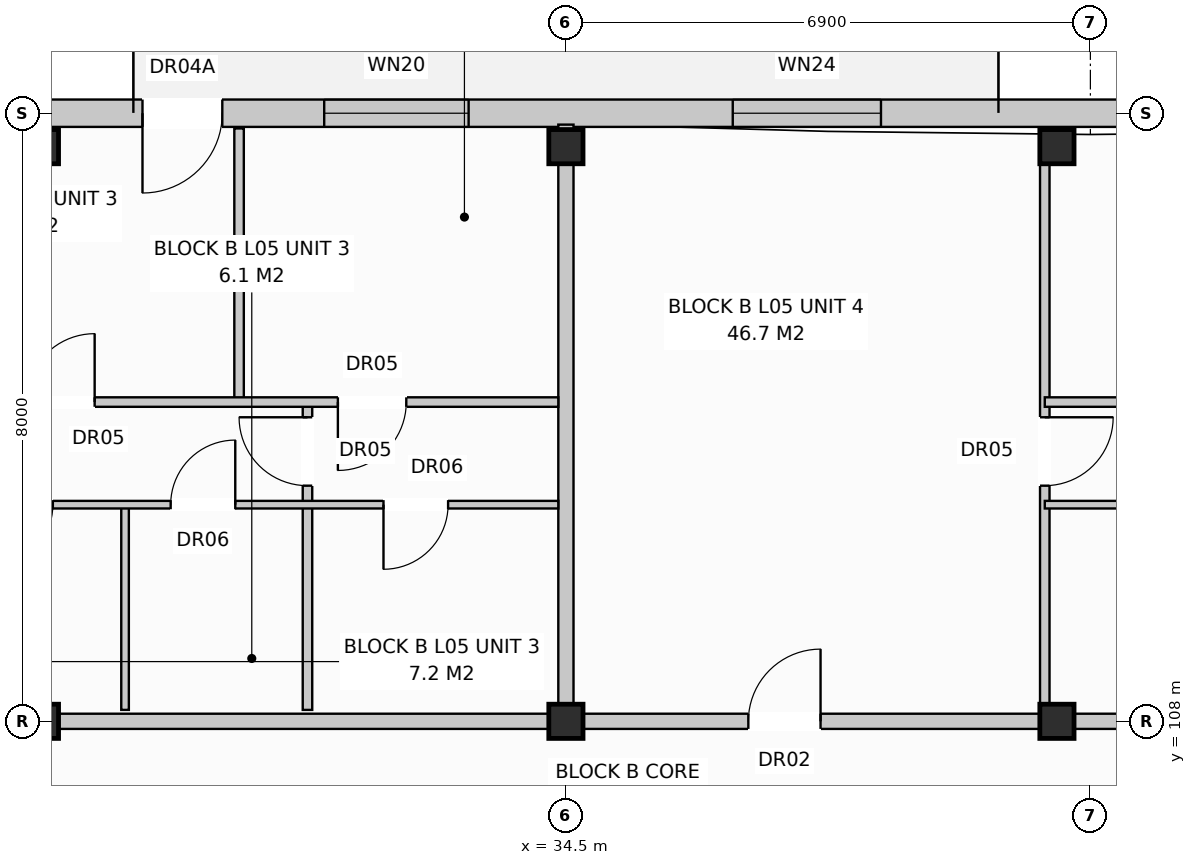
"""IFC4 building model, lengths in metres.
Left out: names, types, materials, properties, quantities, classifications, styles, units other than length and angle.
Written with IfcOpenShell. Run it as: python <this file> out.ifc"""

import sys

from ifc_helpers import new_model, si_unit, direction, frame, frame_2d, origin, origin_with_axes, origin_2d, place, context, subcontext, project, spatial, rectangle, extrude, element, fill, save


model = new_model("IFC4")
c1 = context("Model", 3, precision=1e-05, world=origin(), true_north=direction((0.0, 1.0)))
c2 = subcontext(c1, "Body", "Model", "MODEL_VIEW")
j1 = project(units=[si_unit("LENGTHUNIT", "METRE"), si_unit("PLANEANGLEUNIT", "RADIAN")], contexts=[c1])
p1 = place(None, origin())
s1 = spatial("IfcSite", under=j1, at=p1, CompositionType="ELEMENT")
p2 = place(p1, origin())
s2 = spatial("IfcBuilding", under=s1, at=p2, CompositionType="ELEMENT")
p3 = place(p2, frame((0.0, 0.0, 17.6)))
s3 = spatial("IfcBuildingStorey", under=s2, at=p3, CompositionType="ELEMENT", Elevation=17.6)
for number, where, z_axis, x_axis in (
    (1, (27.6, 108.0, 0.0), (0.0, 0.0, 1.0), (1.0, 0.0, 0.0)),
    (2, (27.6, 115.56, 0.0), (0.0, 0.0, 1.0), (1.0, 0.0, 0.0)),
    (3, (34.5, 108.0, 0.0), (0.0, 0.0, 1.0), (1.0, 0.0, 0.0)),
    (4, (34.5, 115.56, 0.0), (0.0, 0.0, 1.0), (1.0, 0.0, 0.0)),
    (5, (40.96, 108.0, 0.0), (0.0, 0.0, 1.0), (1.0, 0.0, 0.0)),
    (6, (40.96, 115.56, 0.0), (0.0, 0.0, 1.0), (1.0, 0.0, 0.0)),
):
    element("IfcColumn", number, at=place(p3, frame(where, z_axis=z_axis, x_axis=x_axis)), inside=s3, PredefinedType="COLUMN", context=c2, shape_type="SweptSolid", body=[
        extrude(rectangle(XDim=0.45, YDim=0.45, at=origin_2d()), origin(), (0.0, 0.0, 1.0), 3.2),
    ])
p4 = place(p3, frame((0.17, 116.0, 0.0), z_axis=(0.0, 0.0, 1.0), x_axis=(1.0, 0.0, 0.0)))
e7 = element("IfcWall", 7, at=p4, inside=s3, PredefinedType="STANDARD", context=c2, shape_type="SweptSolid", body=[
    extrude(rectangle(XDim=54.86, YDim=0.36, at=frame_2d((27.43, 0.0))), origin(), (0.0, 0.0, 1.0), 2.95),
])
p5 = place(p4, frame((2.459, 0.0, 0.0)))
e8 = element("IfcOpeningElement", 8, at=p5, cuts=e7, PredefinedType="OPENING", context=c2, shape_type="SweptSolid", body=[
    extrude(rectangle(XDim=1.05, YDim=2.12, at=frame_2d((0.525, 1.06))), frame((0.0, 0.192, 0.0), z_axis=(0.0, -1.0, 0.0), x_axis=(1.0, 0.0, 0.0)), (0.0, 0.0, 1.0), 0.384),
])
p6 = place(p4, frame((18.85, 0.0, 0.0)))
e9 = element("IfcOpeningElement", 9, at=p6, cuts=e7, PredefinedType="OPENING", context=c2, shape_type="SweptSolid", body=[
    extrude(rectangle(XDim=1.05, YDim=2.12, at=frame_2d((0.525, 1.06))), frame((0.0, 0.192, 0.0), z_axis=(0.0, -1.0, 0.0), x_axis=(1.0, 0.0, 0.0)), (0.0, 0.0, 1.0), 0.384),
])
p7 = place(p4, frame((28.76, 0.0, 0.0)))
e10 = element("IfcOpeningElement", 10, at=p7, cuts=e7, PredefinedType="OPENING", context=c2, shape_type="SweptSolid", body=[
    extrude(rectangle(XDim=1.05, YDim=2.12, at=frame_2d((0.525, 1.06))), frame((0.0, 0.192, 0.0), z_axis=(0.0, -1.0, 0.0), x_axis=(1.0, 0.0, 0.0)), (0.0, 0.0, 1.0), 0.384),
])
p8 = place(p4, frame((46.45, 0.0, 0.0)))
e11 = element("IfcOpeningElement", 11, at=p8, cuts=e7, PredefinedType="OPENING", context=c2, shape_type="SweptSolid", body=[
    extrude(rectangle(XDim=1.05, YDim=2.12, at=frame_2d((0.525, 1.06))), frame((0.0, 0.192, 0.0), z_axis=(0.0, -1.0, 0.0), x_axis=(1.0, 0.0, 0.0)), (0.0, 0.0, 1.0), 0.384),
])
p9 = place(p4, frame((0.75, 0.0, 0.72)))
e12 = element("IfcOpeningElement", 12, at=p9, cuts=e7, PredefinedType="OPENING", context=c2, shape_type="SweptSolid", body=[
    extrude(rectangle(XDim=1.1, YDim=1.5, at=frame_2d((0.55, 0.75))), frame((0.0, 0.192, 0.0), z_axis=(0.0, -1.0, 0.0), x_axis=(1.0, 0.0, 0.0)), (0.0, 0.0, 1.0), 0.384),
])
p10 = place(p4, frame((4.225, 0.0, 0.8)))
e13 = element("IfcOpeningElement", 13, at=p10, cuts=e7, PredefinedType="OPENING", context=c2, shape_type="SweptSolid", body=[
    extrude(rectangle(XDim=1.95, YDim=1.65, at=frame_2d((0.975, 0.825))), frame((0.0, 0.192, 0.0), z_axis=(0.0, -1.0, 0.0), x_axis=(1.0, 0.0, 0.0)), (0.0, 0.0, 1.0), 0.384),
])
p11 = place(p4, frame((8.0, 0.0, 0.8)))
e14 = element("IfcOpeningElement", 14, at=p11, cuts=e7, PredefinedType="OPENING", context=c2, shape_type="SweptSolid", body=[
    extrude(rectangle(XDim=1.8, YDim=1.7, at=frame_2d((0.9, 0.85))), frame((0.0, 0.192, 0.0), z_axis=(0.0, -1.0, 0.0), x_axis=(1.0, 0.0, 0.0)), (0.0, 0.0, 1.0), 0.384),
])
p12 = place(p4, frame((11.65, 0.0, 0.72)))
e15 = element("IfcOpeningElement", 15, at=p12, cuts=e7, PredefinedType="OPENING", context=c2, shape_type="SweptSolid", body=[
    extrude(rectangle(XDim=1.1, YDim=1.5, at=frame_2d((0.55, 0.75))), frame((0.0, 0.192, 0.0), z_axis=(0.0, -1.0, 0.0), x_axis=(1.0, 0.0, 0.0)), (0.0, 0.0, 1.0), 0.384),
])
p13 = place(p4, frame((16.675, 0.0, 0.8)))
e16 = element("IfcOpeningElement", 16, at=p13, cuts=e7, PredefinedType="OPENING", context=c2, shape_type="SweptSolid", body=[
    extrude(rectangle(XDim=1.95, YDim=1.65, at=frame_2d((0.975, 0.825))), frame((0.0, 0.192, 0.0), z_axis=(0.0, -1.0, 0.0), x_axis=(1.0, 0.0, 0.0)), (0.0, 0.0, 1.0), 0.384),
])
p14 = place(p4, frame((22.3, 0.0, 0.8)))
e17 = element("IfcOpeningElement", 17, at=p14, cuts=e7, PredefinedType="OPENING", context=c2, shape_type="SweptSolid", body=[
    extrude(rectangle(XDim=1.8, YDim=1.7, at=frame_2d((0.9, 0.85))), frame((0.0, 0.192, 0.0), z_axis=(0.0, -1.0, 0.0), x_axis=(1.0, 0.0, 0.0)), (0.0, 0.0, 1.0), 0.384),
])
p15 = place(p4, frame((31.15, 0.0, 0.72)))
e18 = element("IfcOpeningElement", 18, at=p15, cuts=e7, PredefinedType="OPENING", context=c2, shape_type="SweptSolid", body=[
    extrude(rectangle(XDim=1.9, YDim=1.85, at=frame_2d((0.95, 0.925))), frame((0.0, 0.192, 0.0), z_axis=(0.0, -1.0, 0.0), x_axis=(1.0, 0.0, 0.0)), (0.0, 0.0, 1.0), 0.384),
])
p16 = place(p4, frame((36.525, 0.0, 0.8)))
e19 = element("IfcOpeningElement", 19, at=p16, cuts=e7, PredefinedType="OPENING", context=c2, shape_type="SweptSolid", body=[
    extrude(rectangle(XDim=1.95, YDim=1.65, at=frame_2d((0.975, 0.825))), frame((0.0, 0.192, 0.0), z_axis=(0.0, -1.0, 0.0), x_axis=(1.0, 0.0, 0.0)), (0.0, 0.0, 1.0), 0.384),
])
p17 = place(p4, frame((42.3, 0.0, 0.8)))
e20 = element("IfcOpeningElement", 20, at=p17, cuts=e7, PredefinedType="OPENING", context=c2, shape_type="SweptSolid", body=[
    extrude(rectangle(XDim=1.8, YDim=1.7, at=frame_2d((0.9, 0.85))), frame((0.0, 0.192, 0.0), z_axis=(0.0, -1.0, 0.0), x_axis=(1.0, 0.0, 0.0)), (0.0, 0.0, 1.0), 0.384),
])
p18 = place(p4, frame((49.05, 0.0, 0.72)))
e21 = element("IfcOpeningElement", 21, at=p18, cuts=e7, PredefinedType="OPENING", context=c2, shape_type="SweptSolid", body=[
    extrude(rectangle(XDim=1.1, YDim=1.5, at=frame_2d((0.55, 0.75))), frame((0.0, 0.192, 0.0), z_axis=(0.0, -1.0, 0.0), x_axis=(1.0, 0.0, 0.0)), (0.0, 0.0, 1.0), 0.384),
])
p19 = place(p4, frame((52.025, 0.0, 0.8)))
e22 = element("IfcOpeningElement", 22, at=p19, cuts=e7, PredefinedType="OPENING", context=c2, shape_type="SweptSolid", body=[
    extrude(rectangle(XDim=1.95, YDim=1.65, at=frame_2d((0.975, 0.825))), frame((0.0, 0.192, 0.0), z_axis=(0.0, -1.0, 0.0), x_axis=(1.0, 0.0, 0.0)), (0.0, 0.0, 1.0), 0.384),
])
p20 = place(p3, frame((34.5, 108.15, 0.0), z_axis=(0.0, 0.0, 1.0), x_axis=(0.0, 1.0, 0.0)))
e23 = element("IfcWall", 23, at=p20, inside=s3, PredefinedType="PARTITIONING", context=c2, shape_type="SweptSolid", body=[
    extrude(rectangle(XDim=7.7, YDim=0.2, at=frame_2d((3.85, 0.0))), origin(), (0.0, 0.0, 1.0), 2.95),
])
p21 = place(p3, frame((20.7, 108.0, 0.0), z_axis=(0.0, 0.0, 1.0), x_axis=(1.0, 0.0, 0.0)))
e24 = element("IfcWall", 24, at=p21, inside=s3, PredefinedType="PARTITIONING", context=c2, shape_type="SweptSolid", body=[
    extrude(rectangle(XDim=13.8, YDim=0.2, at=frame_2d((6.9, 0.0))), origin(), (0.0, 0.0, 1.0), 2.39),
])
p22 = place(p21, frame((2.4, 0.0, 0.0)))
e25 = element("IfcOpeningElement", 25, at=p22, cuts=e24, PredefinedType="OPENING", context=c2, shape_type="SweptSolid", body=[
    extrude(rectangle(XDim=0.95, YDim=2.15, at=frame_2d((0.475, 1.075))), frame((0.0, 0.112, 0.0), z_axis=(0.0, -1.0, 0.0), x_axis=(1.0, 0.0, 0.0)), (0.0, 0.0, 1.0), 0.224),
])
p23 = place(p3, frame((28.7, 108.15, 0.0), z_axis=(0.0, 0.0, 1.0), x_axis=(0.0, 1.0, 0.0)))
e26 = element("IfcWall", 26, at=p23, inside=s3, PredefinedType="PARTITIONING", context=c2, shape_type="SweptSolid", body=[
    extrude(rectangle(XDim=2.7, YDim=0.1, at=frame_2d((1.35, 0.0))), origin(), (0.0, 0.0, 1.0), 2.59),
])
p24 = place(p3, frame((31.1, 108.15, 0.0), z_axis=(0.0, 0.0, 1.0), x_axis=(0.0, 1.0, 0.0)))
e27 = element("IfcWall", 27, at=p24, inside=s3, PredefinedType="PARTITIONING", context=c2, shape_type="SweptSolid", body=[
    extrude(rectangle(XDim=4.05, YDim=0.125, at=frame_2d((2.025, 0.0))), origin(), (0.0, 0.0, 1.0), 2.95),
])
p25 = place(p24, frame((2.95, 0.0, 0.0)))
e28 = element("IfcOpeningElement", 28, at=p25, cuts=e27, PredefinedType="OPENING", context=c2, shape_type="SweptSolid", body=[
    extrude(rectangle(XDim=0.9, YDim=2.1, at=frame_2d((0.45, 1.05))), frame((0.0, 0.074, 0.0), z_axis=(0.0, -1.0, 0.0), x_axis=(1.0, 0.0, 0.0)), (0.0, 0.0, 1.0), 0.149),
])
p26 = place(p3, frame((30.2, 112.2, 0.0), z_axis=(0.0, 0.0, 1.0), x_axis=(0.0, 1.0, 0.0)))
e29 = element("IfcWall", 29, at=p26, inside=s3, PredefinedType="PARTITIONING", context=c2, shape_type="SweptSolid", body=[
    extrude(rectangle(XDim=3.6, YDim=0.125, at=frame_2d((1.8, 0.0))), origin(), (0.0, 0.0, 1.0), 2.95),
])
p27 = place(p3, frame((25.9, 110.85, 0.0), z_axis=(0.0, 0.0, 1.0), x_axis=(1.0, 0.0, 0.0)))
e30 = element("IfcWall", 30, at=p27, inside=s3, PredefinedType="PARTITIONING", context=c2, shape_type="SweptSolid", body=[
    extrude(rectangle(XDim=8.5, YDim=0.1, at=frame_2d((4.25, 0.0))), origin(), (0.0, 0.0, 1.0), 2.95),
])
p28 = place(p27, frame((1.0, 0.0, 0.0)))
e31 = element("IfcOpeningElement", 31, at=p28, cuts=e30, PredefinedType="OPENING", context=c2, shape_type="SweptSolid", body=[
    extrude(rectangle(XDim=0.85, YDim=2.1, at=frame_2d((0.425, 1.05))), frame((0.0, 0.062, 0.0), z_axis=(0.0, -1.0, 0.0), x_axis=(1.0, 0.0, 0.0)), (0.0, 0.0, 1.0), 0.124),
])
p29 = place(p27, frame((3.4, 0.0, 0.0)))
e32 = element("IfcOpeningElement", 32, at=p29, cuts=e30, PredefinedType="OPENING", context=c2, shape_type="SweptSolid", body=[
    extrude(rectangle(XDim=0.85, YDim=2.05, at=frame_2d((0.425, 1.025))), frame((0.0, 0.062, 0.0), z_axis=(0.0, -1.0, 0.0), x_axis=(1.0, 0.0, 0.0)), (0.0, 0.0, 1.0), 0.124),
])
p30 = place(p27, frame((6.2, 0.0, 0.0)))
e33 = element("IfcOpeningElement", 33, at=p30, cuts=e30, PredefinedType="OPENING", context=c2, shape_type="SweptSolid", body=[
    extrude(rectangle(XDim=0.85, YDim=2.05, at=frame_2d((0.425, 1.025))), frame((0.0, 0.062, 0.0), z_axis=(0.0, -1.0, 0.0), x_axis=(1.0, 0.0, 0.0)), (0.0, 0.0, 1.0), 0.124),
])
p31 = place(p3, frame((25.9, 112.2, 0.0), z_axis=(0.0, 0.0, 1.0), x_axis=(1.0, 0.0, 0.0)))
e34 = element("IfcWall", 34, at=p31, inside=s3, PredefinedType="PARTITIONING", context=c2, shape_type="SweptSolid", body=[
    extrude(rectangle(XDim=8.5, YDim=0.125, at=frame_2d((4.25, 0.0))), origin(), (0.0, 0.0, 1.0), 2.95),
])
p32 = place(p31, frame((1.5, 0.0, 0.0)))
e35 = element("IfcOpeningElement", 35, at=p32, cuts=e34, PredefinedType="OPENING", context=c2, shape_type="SweptSolid", body=[
    extrude(rectangle(XDim=0.9, YDim=2.1, at=frame_2d((0.45, 1.05))), frame((0.0, 0.074, 0.0), z_axis=(0.0, -1.0, 0.0), x_axis=(1.0, 0.0, 0.0)), (0.0, 0.0, 1.0), 0.149),
])
p33 = place(p31, frame((5.6, 0.0, 0.0)))
e36 = element("IfcOpeningElement", 36, at=p33, cuts=e34, PredefinedType="OPENING", context=c2, shape_type="SweptSolid", body=[
    extrude(rectangle(XDim=0.9, YDim=2.1, at=frame_2d((0.45, 1.05))), frame((0.0, 0.074, 0.0), z_axis=(0.0, -1.0, 0.0), x_axis=(1.0, 0.0, 0.0)), (0.0, 0.0, 1.0), 0.149),
])
p34 = place(p3, frame((34.5, 108.0, 0.0), z_axis=(0.0, 0.0, 1.0), x_axis=(1.0, 0.0, 0.0)))
e37 = element("IfcWall", 37, at=p34, inside=s3, PredefinedType="PARTITIONING", context=c2, shape_type="SweptSolid", body=[
    extrude(rectangle(XDim=20.7, YDim=0.2, at=frame_2d((10.35, 0.0))), origin(), (0.0, 0.0, 1.0), 2.39),
])
p35 = place(p34, frame((2.4, 0.0, 0.0)))
e38 = element("IfcOpeningElement", 38, at=p35, cuts=e37, PredefinedType="OPENING", context=c2, shape_type="SweptSolid", body=[
    extrude(rectangle(XDim=0.95, YDim=2.15, at=frame_2d((0.475, 1.075))), frame((0.0, 0.112, 0.0), z_axis=(0.0, -1.0, 0.0), x_axis=(1.0, 0.0, 0.0)), (0.0, 0.0, 1.0), 0.224),
])
p36 = place(p3, frame((40.8, 108.15, 0.0), z_axis=(0.0, 0.0, 1.0), x_axis=(0.0, 1.0, 0.0)))
e39 = element("IfcWall", 39, at=p36, inside=s3, PredefinedType="PARTITIONING", context=c2, shape_type="SweptSolid", body=[
    extrude(rectangle(XDim=7.65, YDim=0.125, at=frame_2d((3.825, 0.0))), origin(), (0.0, 0.0, 1.0), 2.59),
])
p37 = place(p36, frame((2.95, 0.0, 0.0)))
e40 = element("IfcOpeningElement", 40, at=p37, cuts=e39, PredefinedType="OPENING", context=c2, shape_type="SweptSolid", body=[
    extrude(rectangle(XDim=0.9, YDim=2.1, at=frame_2d((0.45, 1.05))), frame((0.0, 0.074, 0.0), z_axis=(0.0, -1.0, 0.0), x_axis=(1.0, 0.0, 0.0)), (0.0, 0.0, 1.0), 0.149),
])
p38 = place(p3, frame((40.8, 110.85, 0.0), z_axis=(0.0, 0.0, 1.0), x_axis=(1.0, 0.0, 0.0)))
e41 = element("IfcWall", 41, at=p38, inside=s3, PredefinedType="PARTITIONING", context=c2, shape_type="SweptSolid", body=[
    extrude(rectangle(XDim=14.3, YDim=0.1, at=frame_2d((7.15, 0.0))), origin(), (0.0, 0.0, 1.0), 2.95),
])
p39 = place(p38, frame((1.6, 0.0, 0.0)))
e42 = element("IfcOpeningElement", 42, at=p39, cuts=e41, PredefinedType="OPENING", context=c2, shape_type="SweptSolid", body=[
    extrude(rectangle(XDim=0.9, YDim=2.1, at=frame_2d((0.45, 1.05))), frame((0.0, 0.062, 0.0), z_axis=(0.0, -1.0, 0.0), x_axis=(1.0, 0.0, 0.0)), (0.0, 0.0, 1.0), 0.124),
])
p40 = place(p38, frame((5.1, 0.0, 0.0)))
e43 = element("IfcOpeningElement", 43, at=p40, cuts=e41, PredefinedType="OPENING", context=c2, shape_type="SweptSolid", body=[
    extrude(rectangle(XDim=0.85, YDim=2.05, at=frame_2d((0.425, 1.025))), frame((0.0, 0.062, 0.0), z_axis=(0.0, -1.0, 0.0), x_axis=(1.0, 0.0, 0.0)), (0.0, 0.0, 1.0), 0.124),
])
p41 = place(p38, frame((8.2, 0.0, 0.0)))
e44 = element("IfcOpeningElement", 44, at=p41, cuts=e41, PredefinedType="OPENING", context=c2, shape_type="SweptSolid", body=[
    extrude(rectangle(XDim=0.85, YDim=2.05, at=frame_2d((0.425, 1.025))), frame((0.0, 0.062, 0.0), z_axis=(0.0, -1.0, 0.0), x_axis=(1.0, 0.0, 0.0)), (0.0, 0.0, 1.0), 0.124),
])
p42 = place(p38, frame((11.6, 0.0, 0.0)))
e45 = element("IfcOpeningElement", 45, at=p42, cuts=e41, PredefinedType="OPENING", context=c2, shape_type="SweptSolid", body=[
    extrude(rectangle(XDim=0.85, YDim=2.05, at=frame_2d((0.425, 1.025))), frame((0.0, 0.062, 0.0), z_axis=(0.0, -1.0, 0.0), x_axis=(1.0, 0.0, 0.0)), (0.0, 0.0, 1.0), 0.124),
])
p43 = place(p3, frame((40.8, 112.2, 0.0), z_axis=(0.0, 0.0, 1.0), x_axis=(1.0, 0.0, 0.0)))
e46 = element("IfcWall", 46, at=p43, inside=s3, PredefinedType="PARTITIONING", context=c2, shape_type="SweptSolid", body=[
    extrude(rectangle(XDim=10.4, YDim=0.125, at=frame_2d((5.2, 0.0))), origin(), (0.0, 0.0, 1.0), 2.95),
])
p44 = place(p43, frame((2.0, 0.0, 0.0)))
e47 = element("IfcOpeningElement", 47, at=p44, cuts=e46, PredefinedType="OPENING", context=c2, shape_type="SweptSolid", body=[
    extrude(rectangle(XDim=0.9, YDim=2.1, at=frame_2d((0.45, 1.05))), frame((0.0, 0.074, 0.0), z_axis=(0.0, -1.0, 0.0), x_axis=(1.0, 0.0, 0.0)), (0.0, 0.0, 1.0), 0.149),
])
p45 = place(p43, frame((7.2, 0.0, 0.0)))
e48 = element("IfcOpeningElement", 48, at=p45, cuts=e46, PredefinedType="OPENING", context=c2, shape_type="SweptSolid", body=[
    extrude(rectangle(XDim=0.9, YDim=2.1, at=frame_2d((0.45, 1.05))), frame((0.0, 0.074, 0.0), z_axis=(0.0, -1.0, 0.0), x_axis=(1.0, 0.0, 0.0)), (0.0, 0.0, 1.0), 0.149),
])
p46 = place(p7, frame((1.05, 0.0, 0.0), z_axis=(0.0, 0.0, 1.0), x_axis=(-1.0, 0.0, 0.0)))
e49 = element("IfcDoor", 49, at=p46, inside=s3, OperationType="SINGLE_SWING_LEFT", PredefinedType="DOOR", context=c2, shape_type="SweptSolid", body=[
    extrude(rectangle(XDim=1.05, YDim=2.12, at=frame_2d((0.525, 1.06))), frame((0.0, 0.025, 0.0), z_axis=(0.0, -1.0, 0.0), x_axis=(1.0, 0.0, 0.0)), (0.0, 0.0, 1.0), 0.05),
])
fill(e10, e49)
p47 = place(p15, origin_with_axes())
e50 = element("IfcWindow", 50, at=p47, inside=s3, PartitioningType="SINGLE_PANEL", PredefinedType="WINDOW", context=c2, shape_type="SweptSolid", body=[
    extrude(rectangle(XDim=1.9, YDim=1.85, at=frame_2d((0.95, 0.925))), frame((0.0, 0.03, 0.0), z_axis=(0.0, -1.0, 0.0), x_axis=(1.0, 0.0, 0.0)), (0.0, 0.0, 1.0), 0.06),
])
fill(e18, e50)
p48 = place(p16, origin_with_axes())
e51 = element("IfcWindow", 51, at=p48, inside=s3, PartitioningType="SINGLE_PANEL", PredefinedType="WINDOW", context=c2, shape_type="SweptSolid", body=[
    extrude(rectangle(XDim=1.95, YDim=1.65, at=frame_2d((0.975, 0.825))), frame((0.0, 0.03, 0.0), z_axis=(0.0, -1.0, 0.0), x_axis=(1.0, 0.0, 0.0)), (0.0, 0.0, 1.0), 0.06),
])
fill(e19, e51)
p49 = place(p25, origin_with_axes())
e52 = element("IfcDoor", 52, at=p49, inside=s3, OperationType="SINGLE_SWING_RIGHT", PredefinedType="DOOR", context=c2, shape_type="SweptSolid", body=[
    extrude(rectangle(XDim=0.9, YDim=2.1, at=frame_2d((0.45, 1.05))), frame((0.0, 0.025, 0.0), z_axis=(0.0, -1.0, 0.0), x_axis=(1.0, 0.0, 0.0)), (0.0, 0.0, 1.0), 0.05),
])
fill(e28, e52)
p50 = place(p29, origin_with_axes())
e53 = element("IfcDoor", 53, at=p50, inside=s3, OperationType="SINGLE_SWING_RIGHT", PredefinedType="DOOR", context=c2, shape_type="SweptSolid", body=[
    extrude(rectangle(XDim=0.85, YDim=2.05, at=frame_2d((0.425, 1.025))), frame((0.0, 0.025, 0.0), z_axis=(0.0, -1.0, 0.0), x_axis=(1.0, 0.0, 0.0)), (0.0, 0.0, 1.0), 0.05),
])
fill(e32, e53)
p51 = place(p30, frame((0.85, 0.0, 0.0), z_axis=(0.0, 0.0, 1.0), x_axis=(-1.0, 0.0, 0.0)))
e54 = element("IfcDoor", 54, at=p51, inside=s3, OperationType="SINGLE_SWING_LEFT", PredefinedType="DOOR", context=c2, shape_type="SweptSolid", body=[
    extrude(rectangle(XDim=0.85, YDim=2.05, at=frame_2d((0.425, 1.025))), frame((0.0, 0.025, 0.0), z_axis=(0.0, -1.0, 0.0), x_axis=(1.0, 0.0, 0.0)), (0.0, 0.0, 1.0), 0.05),
])
fill(e33, e54)
p52 = place(p32, origin_with_axes())
e55 = element("IfcDoor", 55, at=p52, inside=s3, OperationType="SINGLE_SWING_RIGHT", PredefinedType="DOOR", context=c2, shape_type="SweptSolid", body=[
    extrude(rectangle(XDim=0.9, YDim=2.1, at=frame_2d((0.45, 1.05))), frame((0.0, 0.025, 0.0), z_axis=(0.0, -1.0, 0.0), x_axis=(1.0, 0.0, 0.0)), (0.0, 0.0, 1.0), 0.05),
])
fill(e35, e55)
p53 = place(p33, frame((0.9, 0.0, 0.0), z_axis=(0.0, 0.0, 1.0), x_axis=(-1.0, 0.0, 0.0)))
e56 = element("IfcDoor", 56, at=p53, inside=s3, OperationType="SINGLE_SWING_LEFT", PredefinedType="DOOR", context=c2, shape_type="SweptSolid", body=[
    extrude(rectangle(XDim=0.9, YDim=2.1, at=frame_2d((0.45, 1.05))), frame((0.0, 0.025, 0.0), z_axis=(0.0, -1.0, 0.0), x_axis=(1.0, 0.0, 0.0)), (0.0, 0.0, 1.0), 0.05),
])
fill(e36, e56)
p54 = place(p35, origin_with_axes())
e57 = element("IfcDoor", 57, at=p54, inside=s3, OperationType="SINGLE_SWING_RIGHT", PredefinedType="DOOR", context=c2, shape_type="SweptSolid", body=[
    extrude(rectangle(XDim=0.95, YDim=2.15, at=frame_2d((0.475, 1.075))), frame((0.0, 0.025, 0.0), z_axis=(0.0, -1.0, 0.0), x_axis=(1.0, 0.0, 0.0)), (0.0, 0.0, 1.0), 0.05),
])
fill(e38, e57)
p55 = place(p37, frame((0.9, 0.0, 0.0), z_axis=(0.0, 0.0, 1.0), x_axis=(-1.0, 0.0, 0.0)))
e58 = element("IfcDoor", 58, at=p55, inside=s3, OperationType="SINGLE_SWING_RIGHT", PredefinedType="DOOR", context=c2, shape_type="SweptSolid", body=[
    extrude(rectangle(XDim=0.9, YDim=2.1, at=frame_2d((0.45, 1.05))), frame((0.0, 0.025, 0.0), z_axis=(0.0, -1.0, 0.0), x_axis=(1.0, 0.0, 0.0)), (0.0, 0.0, 1.0), 0.05),
])
fill(e40, e58)
save(model, sys.argv[1])
